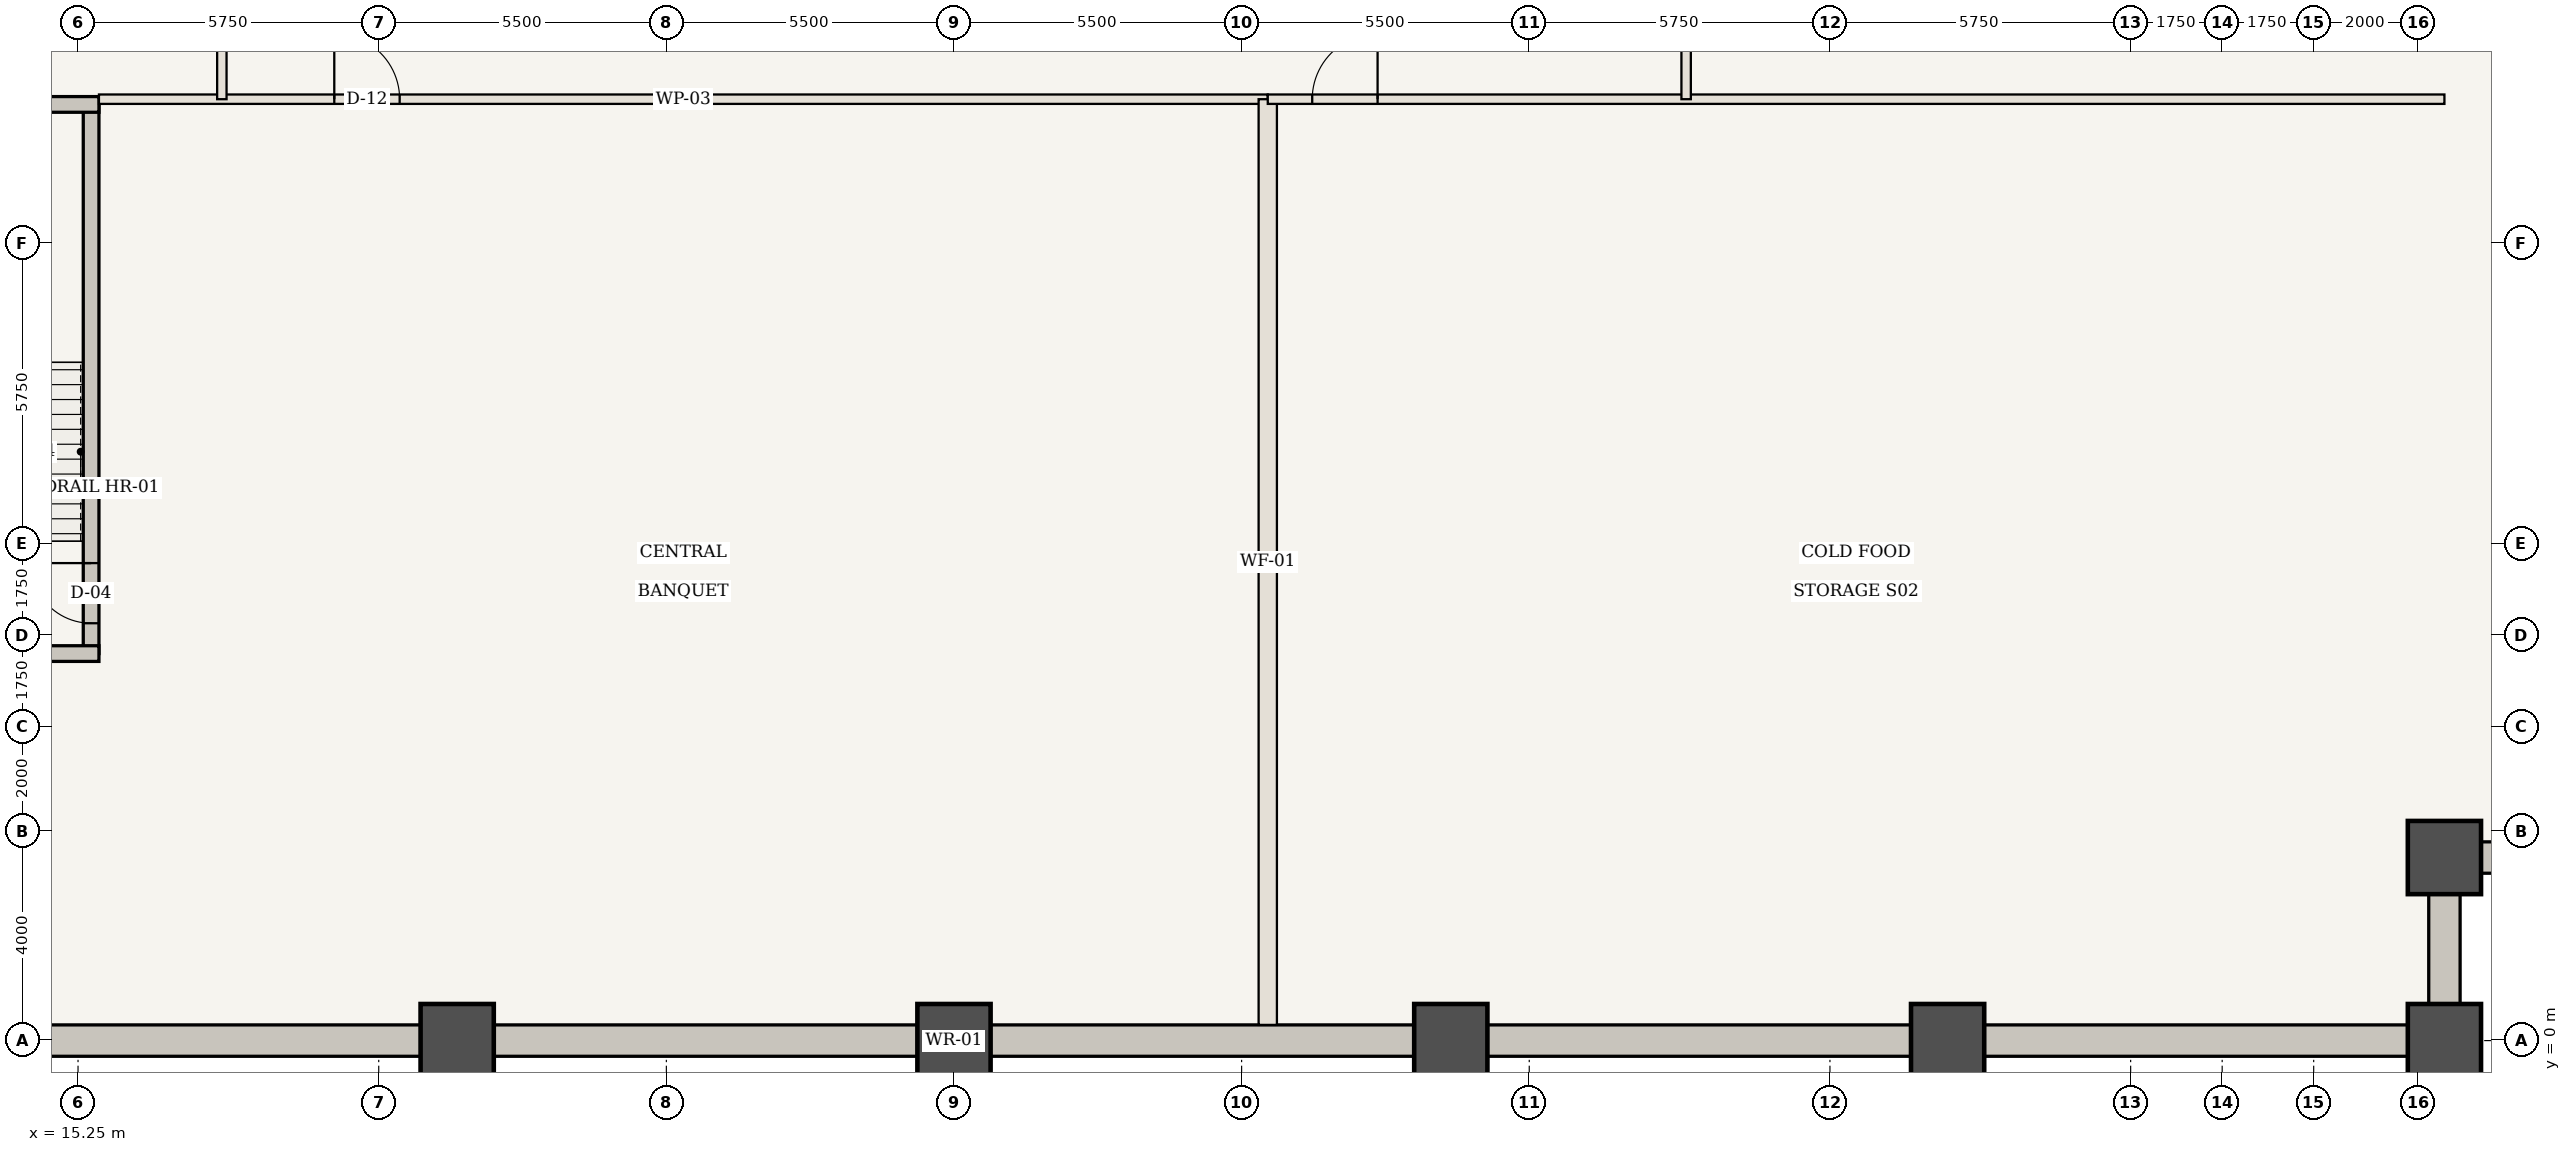
"""IFC4 building model, lengths in metres.
Left out: names, types, materials, properties, quantities, classifications, styles, units other than length and angle.
Written with IfcOpenShell. Run it as: python <this file> out.ifc"""

import sys

from ifc_helpers import new_model, si_unit, direction, frame, frame_2d, origin, origin_2d, place, context, subcontext, project, spatial, rectangle, extrude, element, fill, save


model = new_model("IFC4")
c1 = context("Model", 3, precision=1e-05, world=origin(), true_north=direction((0.0, 1.0)))
c2 = subcontext(c1, "Body", "Model", "MODEL_VIEW")
j1 = project(units=[si_unit("LENGTHUNIT", "METRE"), si_unit("PLANEANGLEUNIT", "RADIAN")], contexts=[c1])
p1 = place(None, origin())
s1 = spatial("IfcSite", under=j1, at=p1, CompositionType="ELEMENT")
p2 = place(p1, origin())
s2 = spatial("IfcBuilding", under=s1, at=p2, CompositionType="ELEMENT")
p3 = place(p2, frame((0.0, 0.0, -4.55)))
s3 = spatial("IfcBuildingStorey", under=s2, at=p3, CompositionType="ELEMENT", Elevation=-4.55)
p4 = place(p3, frame((3.5, 0.0, 0.0), z_axis=(0.0, 0.0, 1.0), x_axis=(1.0, 0.0, 0.0)))
e1 = element("IfcWall", 1, at=p4, inside=s3, PredefinedType="USERDEFINED", context=c2, shape_type="SweptSolid", body=[
    extrude(rectangle(XDim=57.0, YDim=0.6, at=frame_2d((28.5, 0.0))), origin(), (0.0, 0.0, 1.0), 4.55),
])
for number, where, z_axis, x_axis in (
    (2, (60.5, 0.0, 0.0), (0.0, 0.0, 1.0), (0.0, 1.0, 0.0)),
    (3, (60.5, 3.5, 0.0), (0.0, 0.0, 1.0), (1.0, 0.0, 0.0)),
):
    element("IfcWall", number, at=place(p3, frame(where, z_axis=z_axis, x_axis=x_axis)), inside=s3, PredefinedType="USERDEFINED", context=c2, shape_type="SweptSolid", body=[
        extrude(rectangle(XDim=3.5, YDim=0.6, at=frame_2d((1.75, 0.0))), origin(), (0.0, 0.0, 1.0), 4.55),
    ])
for number, where, z_axis, x_axis in (
    (4, (60.5, 0.0, 0.0), (0.0, 0.0, 1.0), (1.0, 0.0, 0.0)),
    (5, (60.5, 3.5, 0.0), (0.0, 0.0, 1.0), (1.0, 0.0, 0.0)),
    (6, (22.5, 0.0, 0.0), (0.0, 0.0, 1.0), (1.0, 0.0, 0.0)),
    (7, (32.0, 0.0, 0.0), (0.0, 0.0, 1.0), (1.0, 0.0, 0.0)),
    (8, (41.5, 0.0, 0.0), (0.0, 0.0, 1.0), (1.0, 0.0, 0.0)),
    (9, (51.0, 0.0, 0.0), (0.0, 0.0, 1.0), (1.0, 0.0, 0.0)),
):
    element("IfcColumn", number, at=place(p3, frame(where, z_axis=z_axis, x_axis=x_axis)), inside=s3, PredefinedType="COLUMN", context=c2, shape_type="SweptSolid", body=[
        extrude(rectangle(XDim=1.4, YDim=1.4, at=origin_2d()), origin(), (0.0, 0.0, 1.0), 4.55),
    ])
p5 = place(p3, frame((15.5, 7.4, 0.0), z_axis=(0.0, 0.0, 1.0), x_axis=(0.0, 1.0, 0.0)))
e10 = element("IfcWall", 10, at=p5, inside=s3, PredefinedType="SHEAR", context=c2, shape_type="SweptSolid", body=[
    extrude(rectangle(XDim=10.5, YDim=0.3, at=frame_2d((5.25, 0.0))), origin(), (0.0, 0.0, 1.0), 4.23),
])
p6 = place(p5, frame((0.58, 0.0, 0.0)))
e11 = element("IfcOpeningElement", 11, at=p6, cuts=e10, PredefinedType="OPENING", context=c2, shape_type="SweptSolid", body=[
    extrude(rectangle(XDim=1.15, YDim=2.15, at=frame_2d((0.575, 1.075))), frame((0.0, 0.16, 0.0), z_axis=(0.0, -1.0, 0.0), x_axis=(1.0, 0.0, 0.0)), (0.0, 0.0, 1.0), 0.32),
])
for number, where, z_axis, x_axis in (
    (12, (10.9, 7.4, 0.0), (0.0, 0.0, 1.0), (1.0, 0.0, 0.0)),
    (13, (10.9, 17.9, 0.0), (0.0, 0.0, 1.0), (1.0, 0.0, 0.0)),
):
    element("IfcWall", number, at=place(p3, frame(where, z_axis=z_axis, x_axis=x_axis)), inside=s3, PredefinedType="SHEAR", context=c2, shape_type="SweptSolid", body=[
        extrude(rectangle(XDim=4.75, YDim=0.3, at=frame_2d((2.375, 0.0))), origin(), (0.0, 0.0, 1.0), 4.23),
    ])
p7 = place(p3, frame((15.65, 18.0, 0.0), z_axis=(0.0, 0.0, 1.0), x_axis=(1.0, 0.0, 0.0)))
e14 = element("IfcWall", 14, at=p7, inside=s3, PredefinedType="STANDARD", context=c2, shape_type="SweptSolid", body=[
    extrude(rectangle(XDim=22.35, YDim=0.18, at=frame_2d((11.175, 0.0))), origin(), (0.0, 0.0, 1.0), 4.23),
])
p8 = place(p7, frame((4.5, 0.0, 0.0)))
e15 = element("IfcOpeningElement", 15, at=p8, cuts=e14, PredefinedType="OPENING", context=c2, shape_type="SweptSolid", body=[
    extrude(rectangle(XDim=1.25, YDim=2.2, at=frame_2d((0.625, 1.1))), frame((0.0, 0.1, 0.0), z_axis=(0.0, -1.0, 0.0), x_axis=(1.0, 0.0, 0.0)), (0.0, 0.0, 1.0), 0.2),
])
p9 = place(p3, frame((38.0, 0.3, 0.0), z_axis=(0.0, 0.0, 1.0), x_axis=(0.0, 1.0, 0.0)))
e16 = element("IfcWall", 16, at=p9, inside=s3, PredefinedType="STANDARD", context=c2, shape_type="SweptSolid", body=[
    extrude(rectangle(XDim=17.7, YDim=0.35, at=frame_2d((8.85, 0.0))), origin(), (0.0, 0.0, 1.0), 4.23),
])
p10 = place(p3, frame((38.0, 18.0, 0.0), z_axis=(0.0, 0.0, 1.0), x_axis=(1.0, 0.0, 0.0)))
e17 = element("IfcWall", 17, at=p10, inside=s3, PredefinedType="STANDARD", context=c2, shape_type="SweptSolid", body=[
    extrude(rectangle(XDim=22.5, YDim=0.18, at=frame_2d((11.25, 0.0))), origin(), (0.0, 0.0, 1.0), 4.23),
])
p11 = place(p10, frame((0.85, 0.0, 0.0)))
e18 = element("IfcOpeningElement", 18, at=p11, cuts=e17, PredefinedType="OPENING", context=c2, shape_type="SweptSolid", body=[
    extrude(rectangle(XDim=1.25, YDim=2.2, at=frame_2d((0.625, 1.1))), frame((0.0, 0.1, 0.0), z_axis=(0.0, -1.0, 0.0), x_axis=(1.0, 0.0, 0.0)), (0.0, 0.0, 1.0), 0.2),
])
p12 = place(p3, frame((18.0, 18.0, 0.0), z_axis=(0.0, 0.0, 1.0), x_axis=(0.0, 1.0, 0.0)))
e19 = element("IfcWall", 19, at=p12, inside=s3, PredefinedType="STANDARD", context=c2, shape_type="SweptSolid", body=[
    extrude(rectangle(XDim=28.0, YDim=0.18, at=frame_2d((14.0, 0.0))), origin(), (0.0, 0.0, 1.0), 4.23),
])
p13 = place(p12, frame((14.95, 0.0, 0.0)))
e20 = element("IfcOpeningElement", 20, at=p13, cuts=e19, PredefinedType="OPENING", context=c2, shape_type="SweptSolid", body=[
    extrude(rectangle(XDim=1.25, YDim=2.2, at=frame_2d((0.625, 1.1))), frame((0.0, 0.1, 0.0), z_axis=(0.0, -1.0, 0.0), x_axis=(1.0, 0.0, 0.0)), (0.0, 0.0, 1.0), 0.2),
])
p14 = place(p3, frame((46.0, 18.0, 0.0), z_axis=(0.0, 0.0, 1.0), x_axis=(0.0, 1.0, 0.0)))
e21 = element("IfcWall", 21, at=p14, inside=s3, PredefinedType="STANDARD", context=c2, shape_type="SweptSolid", body=[
    extrude(rectangle(XDim=28.0, YDim=0.18, at=frame_2d((14.0, 0.0))), origin(), (0.0, 0.0, 1.0), 4.23),
])
p15 = place(p14, frame((14.95, 0.0, 0.0)))
e22 = element("IfcOpeningElement", 22, at=p15, cuts=e21, PredefinedType="OPENING", context=c2, shape_type="SweptSolid", body=[
    extrude(rectangle(XDim=1.25, YDim=2.2, at=frame_2d((0.625, 1.1))), frame((0.0, 0.1, 0.0), z_axis=(0.0, -1.0, 0.0), x_axis=(1.0, 0.0, 0.0)), (0.0, 0.0, 1.0), 0.2),
])
p16 = place(p6, origin())
e23 = element("IfcDoor", 23, at=p16, inside=s3, OperationType="SINGLE_SWING_RIGHT", PredefinedType="DOOR", context=c2, shape_type="SweptSolid", body=[
    extrude(rectangle(XDim=1.15, YDim=2.15, at=frame_2d((0.575, 1.075))), frame((0.0, 0.025, 0.0), z_axis=(0.0, -1.0, 0.0), x_axis=(1.0, 0.0, 0.0)), (0.0, 0.0, 1.0), 0.05),
])
fill(e11, e23)
p17 = place(p8, origin())
e24 = element("IfcDoor", 24, at=p17, inside=s3, OperationType="SINGLE_SWING_LEFT", PredefinedType="DOOR", context=c2, shape_type="SweptSolid", body=[
    extrude(rectangle(XDim=1.25, YDim=2.2, at=frame_2d((0.625, 1.1))), frame((0.0, 0.025, 0.0), z_axis=(0.0, -1.0, 0.0), x_axis=(1.0, 0.0, 0.0)), (0.0, 0.0, 1.0), 0.05),
])
fill(e15, e24)
p18 = place(p11, origin())
e25 = element("IfcDoor", 25, at=p18, inside=s3, OperationType="SINGLE_SWING_RIGHT", PredefinedType="DOOR", context=c2, shape_type="SweptSolid", body=[
    extrude(rectangle(XDim=1.25, YDim=2.2, at=frame_2d((0.625, 1.1))), frame((0.0, 0.025, 0.0), z_axis=(0.0, -1.0, 0.0), x_axis=(1.0, 0.0, 0.0)), (0.0, 0.0, 1.0), 0.05),
])
fill(e18, e25)
save(model, sys.argv[1])
